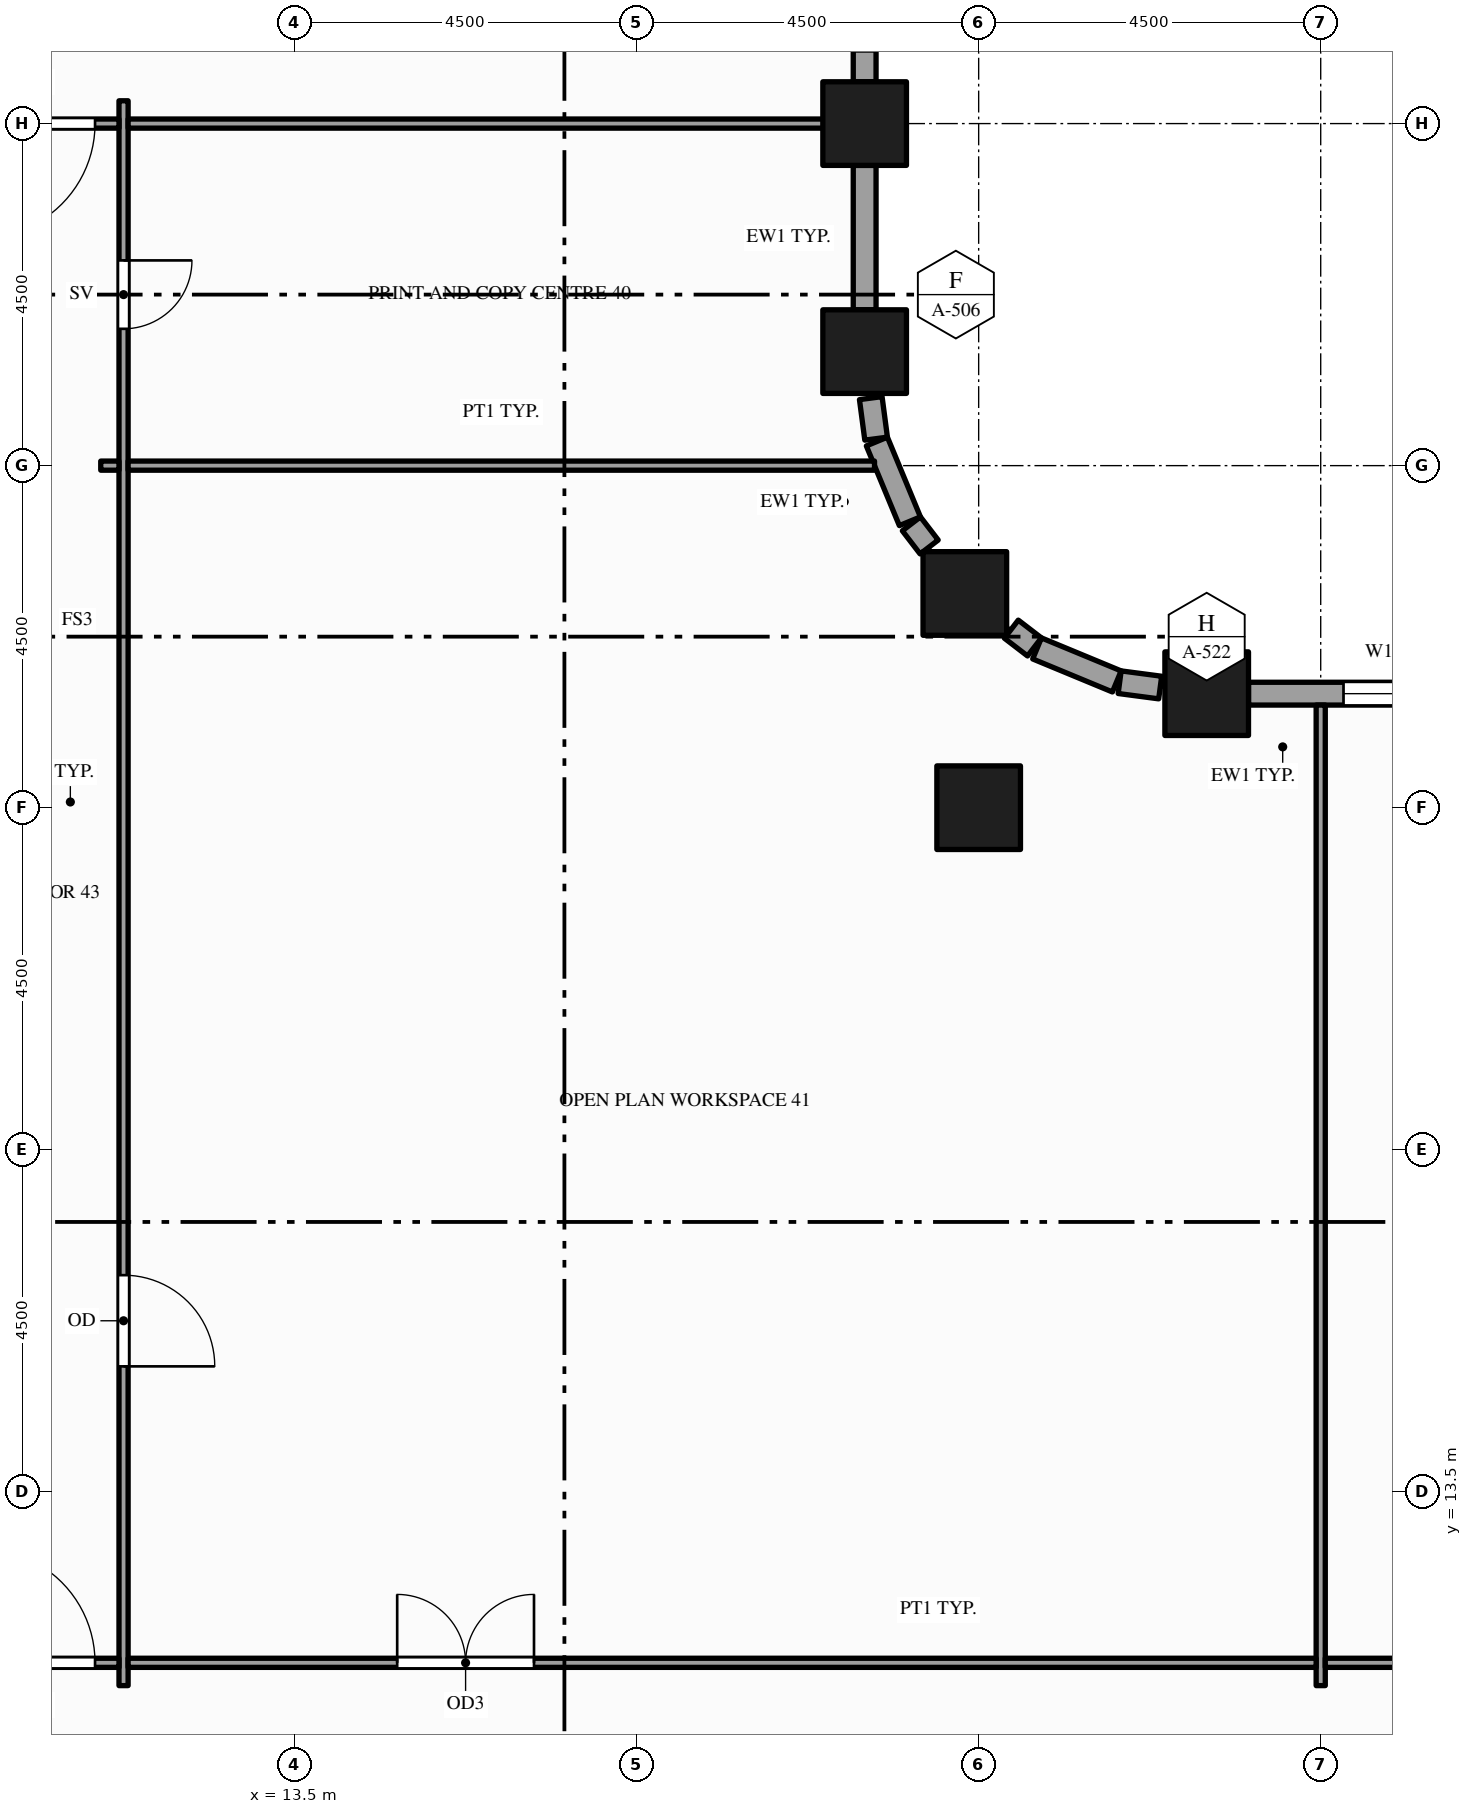
"""IFC4 building model, lengths in metres.
Left out: names, types, materials, properties, quantities, classifications, styles, units other than length and angle.
Written with IfcOpenShell. Run it as: python <this file> out.ifc"""

import sys

from ifc_helpers import new_model, si_unit, direction, frame, frame_2d, origin, origin_2d, place, context, subcontext, project, spatial, rectangle, hollow_rectangle, extrude, element, fill, save


model = new_model("IFC4")
c1 = context("Model", 3, precision=1e-05, world=origin(), true_north=direction((0.0, 1.0)))
c2 = subcontext(c1, "Body", "Model", "MODEL_VIEW")
j1 = project(units=[si_unit("LENGTHUNIT", "METRE"), si_unit("PLANEANGLEUNIT", "RADIAN")], contexts=[c1])
p1 = place(None, origin())
s1 = spatial("IfcSite", under=j1, at=p1, CompositionType="ELEMENT")
p2 = place(p1, origin())
s2 = spatial("IfcBuilding", under=s1, at=p2, CompositionType="ELEMENT")
p3 = place(p2, frame((0.0, 0.0, 33.0)))
s3 = spatial("IfcBuildingStorey", under=s2, at=p3, CompositionType="ELEMENT", Elevation=33.0)
for number, where, z_axis, x_axis in (
    (1, (21.0, 28.5, -0.15), (0.0, 0.0, 1.0), (1.0, 0.0, 0.0)),
    (2, (21.0, 31.5, -0.15), (0.0, 0.0, 1.0), (1.0, 0.0, 0.0)),
    (3, (22.318, 25.318, -0.15), (0.0, 0.0, 1.0), (1.0, 0.0, 0.0)),
    (4, (22.5, 22.5, -0.15), (0.0, 0.0, 1.0), (1.0, 0.0, 0.0)),
    (5, (25.5, 24.0, -0.15), (0.0, 0.0, 1.0), (1.0, 0.0, 0.0)),
):
    element("IfcColumn", number, at=place(p3, frame(where, z_axis=z_axis, x_axis=x_axis)), inside=s3, PredefinedType="COLUMN", context=c2, shape_type="SweptSolid", body=[
        extrude(hollow_rectangle(XDim=1.1, YDim=1.1, WallThickness=0.06, at=origin_2d()), origin(), (0.0, 0.0, 1.0), 4.0),
    ])
p4 = place(p3, frame((30.95, 24.0, 0.0), z_axis=(0.0, 0.0, 1.0), x_axis=(-1.0, 0.0, 0.0)))
e6 = element("IfcWall", 6, at=p4, inside=s3, PredefinedType="STANDARD", context=c2, shape_type="SweptSolid", body=[
    extrude(rectangle(XDim=4.9, YDim=0.3, at=frame_2d((2.45, 0.0))), origin(), (0.0, 0.0, 1.0), 3.144),
])
p5 = place(p4, frame((0.4, 0.0, 0.9)))
e7 = element("IfcOpeningElement", 7, at=p5, cuts=e6, PredefinedType="OPENING", context=c2, shape_type="SweptSolid", body=[
    extrude(rectangle(XDim=1.0, YDim=2.0, at=frame_2d((0.5, 1.0))), frame((0.0, 0.16, 0.0), z_axis=(0.0, -1.0, 0.0), x_axis=(1.0, 0.0, 0.0)), (0.0, 0.0, 1.0), 0.32),
])
p6 = place(p4, frame((2.0, 0.0, 0.9)))
e8 = element("IfcOpeningElement", 8, at=p6, cuts=e6, PredefinedType="OPENING", context=c2, shape_type="SweptSolid", body=[
    extrude(rectangle(XDim=1.65, YDim=2.0, at=frame_2d((0.825, 1.0))), frame((0.0, 0.16, 0.0), z_axis=(0.0, -1.0, 0.0), x_axis=(1.0, 0.0, 0.0)), (0.0, 0.0, 1.0), 0.32),
])
p7 = place(p3, frame((24.888, 24.081, 0.0), z_axis=(0.0, 0.0, 1.0), x_axis=(-0.991417173479, 0.130736330569, 0.0)))
e9 = element("IfcWall", 9, at=p7, inside=s3, PredefinedType="STANDARD", context=c2, shape_type="SweptSolid", body=[
    extrude(rectangle(XDim=0.538, YDim=0.3, at=frame_2d((0.269, 0.0))), origin(), (0.0, 0.0, 1.0), 2.938),
])
p8 = place(p3, frame((24.317, 24.161, 0.0), z_axis=(0.0, 0.0, 1.0), x_axis=(-0.923914616768, 0.382598720491, 0.0)))
e10 = element("IfcWall", 10, at=p8, inside=s3, PredefinedType="STANDARD", context=c2, shape_type="SweptSolid", body=[
    extrude(rectangle(XDim=1.135, YDim=0.3, at=frame_2d((0.568, 0.0))), origin(), (0.0, 0.0, 1.0), 3.144),
])
for number, where, z_axis, x_axis in (
    (11, (23.234, 24.615, 0.0), (0.0, 0.0, 1.0), (-0.794, 0.609, 0.0)),
    (12, (21.849, 25.93, 0.0), (0.0, 0.0, 1.0), (-0.609, 0.794, 0.0)),
):
    element("IfcWall", number, at=place(p3, frame(where, z_axis=z_axis, x_axis=x_axis)), inside=s3, PredefinedType="STANDARD", context=c2, shape_type="SweptSolid", body=[
        extrude(rectangle(XDim=0.384, YDim=0.3, at=frame_2d((0.192, 0.0))), origin(), (0.0, 0.0, 1.0), 3.144),
    ])
p9 = place(p3, frame((21.595, 26.268, 0.0), z_axis=(0.0, 0.0, 1.0), x_axis=(-0.382598720491, 0.923914616768, 0.0)))
e13 = element("IfcWall", 13, at=p9, inside=s3, PredefinedType="STANDARD", context=c2, shape_type="SweptSolid", body=[
    extrude(rectangle(XDim=1.135, YDim=0.3, at=frame_2d((0.568, 0.0))), origin(), (0.0, 0.0, 1.0), 3.144),
])
p10 = place(p3, frame((21.151, 27.355, 0.0), z_axis=(0.0, 0.0, 1.0), x_axis=(-0.130736330569, 0.991417173479, 0.0)))
e14 = element("IfcWall", 14, at=p10, inside=s3, PredefinedType="STANDARD", context=c2, shape_type="SweptSolid", body=[
    extrude(rectangle(XDim=0.538, YDim=0.3, at=frame_2d((0.269, 0.0))), origin(), (0.0, 0.0, 1.0), 3.144),
])
p11 = place(p3, frame((21.0, 29.05, 0.0), z_axis=(0.0, 0.0, 1.0), x_axis=(0.0, 1.0, 0.0)))
e15 = element("IfcWall", 15, at=p11, inside=s3, PredefinedType="STANDARD", context=c2, shape_type="SweptSolid", body=[
    extrude(rectangle(XDim=1.9, YDim=0.3, at=frame_2d((0.95, 0.0))), origin(), (0.0, 0.0, 1.0), 3.144),
])
p12 = place(p3, frame((21.0, 32.05, 0.0), z_axis=(0.0, 0.0, 1.0), x_axis=(0.0, 1.0, 0.0)))
e16 = element("IfcWall", 16, at=p12, inside=s3, PredefinedType="STANDARD", context=c2, shape_type="SweptSolid", body=[
    extrude(rectangle(XDim=3.95, YDim=0.3, at=frame_2d((1.975, 0.0))), origin(), (0.0, 0.0, 1.0), 3.144),
])
p13 = place(p12, frame((0.4, 0.0, 0.9)))
e17 = element("IfcOpeningElement", 17, at=p13, cuts=e16, PredefinedType="OPENING", context=c2, shape_type="SweptSolid", body=[
    extrude(rectangle(XDim=1.0, YDim=2.0, at=frame_2d((0.5, 1.0))), frame((0.0, 0.16, 0.0), z_axis=(0.0, -1.0, 0.0), x_axis=(1.0, 0.0, 0.0)), (0.0, 0.0, 1.0), 0.32),
])
p14 = place(p12, frame((2.0, 0.0, 0.9)))
e18 = element("IfcOpeningElement", 18, at=p14, cuts=e16, PredefinedType="OPENING", context=c2, shape_type="SweptSolid", body=[
    extrude(rectangle(XDim=1.55, YDim=2.0, at=frame_2d((0.775, 1.0))), frame((0.0, 0.16, 0.0), z_axis=(0.0, -1.0, 0.0), x_axis=(1.0, 0.0, 0.0)), (0.0, 0.0, 1.0), 0.32),
])
p15 = place(p3, frame((11.25, 10.95, 0.0), z_axis=(0.0, 0.0, 1.0), x_axis=(0.0, 1.0, 0.0)))
e19 = element("IfcWall", 19, at=p15, inside=s3, PredefinedType="PARTITIONING", context=c2, shape_type="SweptSolid", body=[
    extrude(rectangle(XDim=20.85, YDim=0.12, at=frame_2d((10.425, 0.0))), origin(), (0.0, 0.0, 1.0), 2.6),
])
p16 = place(p15, frame((17.85, 0.0, 0.0)))
e20 = element("IfcOpeningElement", 20, at=p16, cuts=e19, PredefinedType="OPENING", context=c2, shape_type="SweptSolid", body=[
    extrude(rectangle(XDim=0.9, YDim=2.1, at=frame_2d((0.45, 1.05))), frame((0.0, 0.07, 0.0), z_axis=(0.0, -1.0, 0.0), x_axis=(1.0, 0.0, 0.0)), (0.0, 0.0, 1.0), 0.14),
])
p17 = place(p15, frame((4.2, 0.0, 0.0)))
e21 = element("IfcOpeningElement", 21, at=p17, cuts=e19, PredefinedType="OPENING", context=c2, shape_type="SweptSolid", body=[
    extrude(rectangle(XDim=1.2, YDim=2.1, at=frame_2d((0.6, 1.05))), frame((0.0, 0.07, 0.0), z_axis=(0.0, -1.0, 0.0), x_axis=(1.0, 0.0, 0.0)), (0.0, 0.0, 1.0), 0.14),
])
p18 = place(p3, frame((27.0, 10.95, 0.0), z_axis=(0.0, 0.0, 1.0), x_axis=(0.0, 1.0, 0.0)))
e22 = element("IfcWall", 22, at=p18, inside=s3, PredefinedType="PARTITIONING", context=c2, shape_type="SweptSolid", body=[
    extrude(rectangle(XDim=12.9, YDim=0.12, at=frame_2d((6.45, 0.0))), origin(), (0.0, 0.0, 1.0), 2.938),
])
p19 = place(p3, frame((9.06, 11.25, 0.0), z_axis=(0.0, 0.0, 1.0), x_axis=(1.0, 0.0, 0.0)))
e23 = element("IfcWall", 23, at=p19, inside=s3, PredefinedType="PARTITIONING", context=c2, shape_type="SweptSolid", body=[
    extrude(rectangle(XDim=2.13, YDim=0.12, at=frame_2d((1.065, 0.0))), origin(), (0.0, 0.0, 1.0), 2.938),
])
p20 = place(p19, frame((0.315, 0.0, 0.0)))
e24 = element("IfcOpeningElement", 24, at=p20, cuts=e23, PredefinedType="OPENING", context=c2, shape_type="SweptSolid", body=[
    extrude(rectangle(XDim=1.5, YDim=2.1, at=frame_2d((0.75, 1.05))), frame((0.0, 0.07, 0.0), z_axis=(0.0, -1.0, 0.0), x_axis=(1.0, 0.0, 0.0)), (0.0, 0.0, 1.0), 0.14),
])
p21 = place(p3, frame((11.31, 11.25, 0.0), z_axis=(0.0, 0.0, 1.0), x_axis=(1.0, 0.0, 0.0)))
e25 = element("IfcWall", 25, at=p21, inside=s3, PredefinedType="PARTITIONING", context=c2, shape_type="SweptSolid", body=[
    extrude(rectangle(XDim=15.63, YDim=0.12, at=frame_2d((7.815, 0.0))), origin(), (0.0, 0.0, 1.0), 2.938),
])
p22 = place(p21, frame((3.54, 0.0, 0.0)))
e26 = element("IfcOpeningElement", 26, at=p22, cuts=e25, PredefinedType="OPENING", context=c2, shape_type="SweptSolid", body=[
    extrude(rectangle(XDim=1.8, YDim=2.1, at=frame_2d((0.9, 1.05))), frame((0.0, 0.07, 0.0), z_axis=(0.0, -1.0, 0.0), x_axis=(1.0, 0.0, 0.0)), (0.0, 0.0, 1.0), 0.14),
])
p23 = place(p3, frame((27.06, 11.25, 0.0), z_axis=(0.0, 0.0, 1.0), x_axis=(1.0, 0.0, 0.0)))
e27 = element("IfcWall", 27, at=p23, inside=s3, PredefinedType="PARTITIONING", context=c2, shape_type="SweptSolid", body=[
    extrude(rectangle(XDim=11.13, YDim=0.12, at=frame_2d((5.565, 0.0))), origin(), (0.0, 0.0, 1.0), 2.938),
])
p24 = place(p23, frame((4.665, 0.0, 0.0)))
e28 = element("IfcOpeningElement", 28, at=p24, cuts=e27, PredefinedType="OPENING", context=c2, shape_type="SweptSolid", body=[
    extrude(rectangle(XDim=1.8, YDim=2.1, at=frame_2d((0.9, 1.05))), frame((0.0, 0.07, 0.0), z_axis=(0.0, -1.0, 0.0), x_axis=(1.0, 0.0, 0.0)), (0.0, 0.0, 1.0), 0.14),
])
p25 = place(p3, frame((10.95, 27.0, 0.0), z_axis=(0.0, 0.0, 1.0), x_axis=(1.0, 0.0, 0.0)))
e29 = element("IfcWall", 29, at=p25, inside=s3, PredefinedType="PARTITIONING", context=c2, shape_type="SweptSolid", body=[
    extrude(rectangle(XDim=0.24, YDim=0.12, at=frame_2d((0.12, 0.0))), origin(), (0.0, 0.0, 1.0), 2.938),
])
p26 = place(p3, frame((11.31, 27.0, 0.0), z_axis=(0.0, 0.0, 1.0), x_axis=(1.0, 0.0, 0.0)))
e30 = element("IfcWall", 30, at=p26, inside=s3, PredefinedType="PARTITIONING", context=c2, shape_type="SweptSolid", body=[
    extrude(rectangle(XDim=9.82, YDim=0.12, at=frame_2d((4.91, 0.0))), origin(), (0.0, 0.0, 1.0), 2.938),
])
p27 = place(p3, frame((9.06, 31.5, 0.0), z_axis=(0.0, 0.0, 1.0), x_axis=(1.0, 0.0, 0.0)))
e31 = element("IfcWall", 31, at=p27, inside=s3, PredefinedType="PARTITIONING", context=c2, shape_type="SweptSolid", body=[
    extrude(rectangle(XDim=2.13, YDim=0.12, at=frame_2d((1.065, 0.0))), origin(), (0.0, 0.0, 1.0), 2.938),
])
p28 = place(p27, frame((0.315, 0.0, 0.0)))
e32 = element("IfcOpeningElement", 32, at=p28, cuts=e31, PredefinedType="OPENING", context=c2, shape_type="SweptSolid", body=[
    extrude(rectangle(XDim=1.5, YDim=2.1, at=frame_2d((0.75, 1.05))), frame((0.0, 0.07, 0.0), z_axis=(0.0, -1.0, 0.0), x_axis=(1.0, 0.0, 0.0)), (0.0, 0.0, 1.0), 0.14),
])
p29 = place(p3, frame((11.31, 31.5, 0.0), z_axis=(0.0, 0.0, 1.0), x_axis=(1.0, 0.0, 0.0)))
e33 = element("IfcWall", 33, at=p29, inside=s3, PredefinedType="PARTITIONING", context=c2, shape_type="SweptSolid", body=[
    extrude(rectangle(XDim=9.54, YDim=0.12, at=frame_2d((4.77, 0.0))), origin(), (0.0, 0.0, 1.0), 2.938),
])
p30 = place(p6, origin())
e34 = element("IfcWindow", 34, at=p30, inside=s3, PartitioningType="SINGLE_PANEL", PredefinedType="WINDOW", context=c2, shape_type="SweptSolid", body=[
    extrude(rectangle(XDim=1.65, YDim=2.0, at=frame_2d((0.825, 1.0))), frame((0.0, 0.03, 0.0), z_axis=(0.0, -1.0, 0.0), x_axis=(1.0, 0.0, 0.0)), (0.0, 0.0, 1.0), 0.06),
])
fill(e8, e34)
p31 = place(p22, origin())
e35 = element("IfcDoor", 35, at=p31, inside=s3, OperationType="DOUBLE_DOOR_SINGLE_SWING", PredefinedType="DOOR", context=c2, shape_type="SweptSolid", body=[
    extrude(rectangle(XDim=1.8, YDim=2.1, at=frame_2d((0.9, 1.05))), frame((0.0, 0.025, 0.0), z_axis=(0.0, -1.0, 0.0), x_axis=(1.0, 0.0, 0.0)), (0.0, 0.0, 1.0), 0.05),
])
fill(e26, e35)
p32 = place(p20, origin())
e36 = element("IfcDoor", 36, at=p32, inside=s3, OperationType="SINGLE_SWING_LEFT", PredefinedType="DOOR", context=c2, shape_type="SweptSolid", body=[
    extrude(rectangle(XDim=1.5, YDim=2.1, at=frame_2d((0.75, 1.05))), frame((0.0, 0.025, 0.0), z_axis=(0.0, -1.0, 0.0), x_axis=(1.0, 0.0, 0.0)), (0.0, 0.0, 1.0), 0.05),
])
fill(e24, e36)
p33 = place(p28, origin())
e37 = element("IfcDoor", 37, at=p33, inside=s3, OperationType="SINGLE_SWING_LEFT", PredefinedType="DOOR", context=c2, shape_type="SweptSolid", body=[
    extrude(rectangle(XDim=1.5, YDim=2.1, at=frame_2d((0.75, 1.05))), frame((0.0, 0.025, 0.0), z_axis=(0.0, -1.0, 0.0), x_axis=(1.0, 0.0, 0.0)), (0.0, 0.0, 1.0), 0.05),
])
fill(e32, e37)
p34 = place(p16, origin())
e38 = element("IfcDoor", 38, at=p34, inside=s3, OperationType="SINGLE_SWING_RIGHT", PredefinedType="DOOR", context=c2, shape_type="SweptSolid", body=[
    extrude(rectangle(XDim=0.9, YDim=2.1, at=frame_2d((0.45, 1.05))), frame((0.0, 0.025, 0.0), z_axis=(0.0, -1.0, 0.0), x_axis=(1.0, 0.0, 0.0)), (0.0, 0.0, 1.0), 0.05),
])
fill(e20, e38)
p35 = place(p17, origin())
e39 = element("IfcDoor", 39, at=p35, inside=s3, OperationType="SINGLE_SWING_LEFT", PredefinedType="DOOR", context=c2, shape_type="SweptSolid", body=[
    extrude(rectangle(XDim=1.2, YDim=2.1, at=frame_2d((0.6, 1.05))), frame((0.0, 0.025, 0.0), z_axis=(0.0, -1.0, 0.0), x_axis=(1.0, 0.0, 0.0)), (0.0, 0.0, 1.0), 0.05),
])
fill(e21, e39)
save(model, sys.argv[1])
